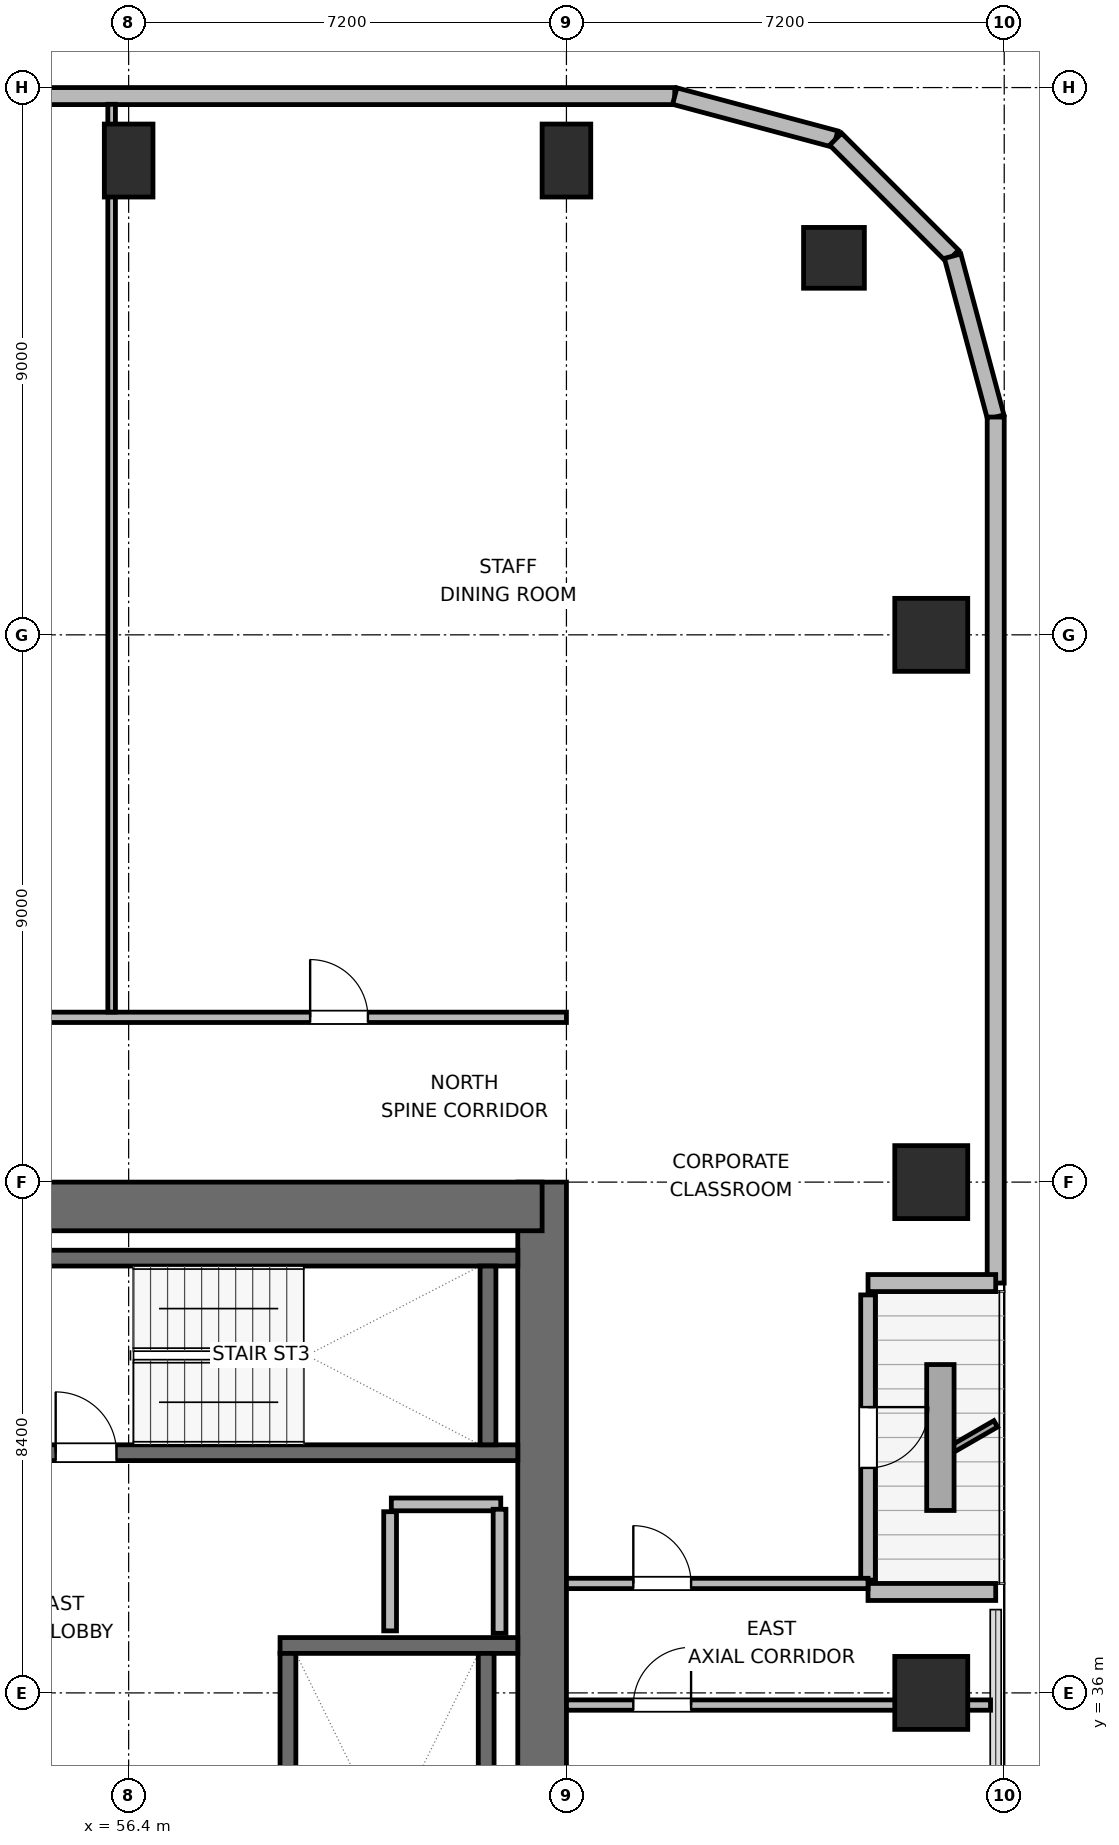
"""IFC4 building model, lengths in metres.
Left out: names, types, materials, properties, quantities, classifications, styles, units other than length and angle.
Written with IfcOpenShell. Run it as: python <this file> out.ifc"""

import sys

from ifc_helpers import new_model, si_unit, direction, frame, frame_2d, origin, origin_2d, place, context, subcontext, project, spatial, rectangle, circle, extrude, element, fill, save


model = new_model("IFC4")
c1 = context("Model", 3, precision=1e-05, world=origin(), true_north=direction((0.0, 1.0)))
c2 = subcontext(c1, "Body", "Model", "MODEL_VIEW")
j1 = project(units=[si_unit("LENGTHUNIT", "METRE"), si_unit("PLANEANGLEUNIT", "RADIAN")], contexts=[c1])
p1 = place(None, origin())
s1 = spatial("IfcSite", under=j1, at=p1, CompositionType="ELEMENT")
p2 = place(p1, origin())
s2 = spatial("IfcBuilding", under=s1, at=p2, CompositionType="ELEMENT")
p3 = place(p2, frame((0.0, 0.0, 162.3)))
s3 = spatial("IfcBuildingStorey", under=s2, at=p3, CompositionType="ELEMENT", Elevation=162.3)
p4 = place(p3, frame((63.2, 27.6, 0.0), z_axis=(0.0, 0.0, 1.0), x_axis=(0.0, 1.0, 0.0)))
e1 = element("IfcWall", 1, at=p4, inside=s3, PredefinedType="SHEAR", context=c2, shape_type="SweptSolid", body=[
    extrude(rectangle(XDim=16.8, YDim=0.8, at=frame_2d((8.4, 0.0))), origin(), (0.0, 0.0, 1.0), 3.9),
])
p5 = place(p3, frame((54.0, 44.0, 0.0), z_axis=(0.0, 0.0, 1.0), x_axis=(1.0, 0.0, 0.0)))
e2 = element("IfcWall", 2, at=p5, inside=s3, PredefinedType="SHEAR", context=c2, shape_type="SweptSolid", body=[
    extrude(rectangle(XDim=9.2, YDim=0.8, at=frame_2d((4.6, 0.0))), origin(), (0.0, 0.0, 1.0), 3.9),
])
p6 = place(p3, frame((58.89, 36.78, 0.0), z_axis=(0.0, 0.0, 1.0), x_axis=(1.0, 0.0, 0.0)))
e3 = element("IfcWall", 3, at=p6, inside=s3, PredefinedType="SHEAR", context=c2, shape_type="SweptSolid", body=[
    extrude(rectangle(XDim=3.91, YDim=0.26, at=frame_2d((1.955, 0.0))), origin(), (0.0, 0.0, 1.0), 3.9),
])
p7 = place(p3, frame((59.02, 29.05, 0.0), z_axis=(0.0, 0.0, 1.0), x_axis=(0.0, 1.0, 0.0)))
e4 = element("IfcWall", 4, at=p7, inside=s3, PredefinedType="SHEAR", context=c2, shape_type="SweptSolid", body=[
    extrude(rectangle(XDim=7.6, YDim=0.26, at=frame_2d((3.8, 0.0))), origin(), (0.0, 0.0, 1.0), 3.9),
])
p8 = place(p7, frame((0.3, 0.0, 0.0)))
e5 = element("IfcOpeningElement", 5, at=p8, cuts=e4, PredefinedType="OPENING", context=c2, shape_type="SweptSolid", body=[
    extrude(rectangle(XDim=1.0, YDim=2.04, at=frame_2d((0.5, 1.02))), frame((0.0, 0.14, 0.0), z_axis=(0.0, -1.0, 0.0), x_axis=(1.0, 0.0, 0.0)), (0.0, 0.0, 1.0), 0.28),
])
p9 = place(p3, frame((62.28, 29.05, 0.0), z_axis=(0.0, 0.0, 1.0), x_axis=(0.0, 1.0, 0.0)))
e6 = element("IfcWall", 6, at=p9, inside=s3, PredefinedType="SHEAR", context=c2, shape_type="SweptSolid", body=[
    extrude(rectangle(XDim=7.6, YDim=0.26, at=frame_2d((3.8, 0.0))), origin(), (0.0, 0.0, 1.0), 3.9),
])
p10 = place(p3, frame((54.4, 39.95, 0.0), z_axis=(0.0, 0.0, 1.0), x_axis=(1.0, 0.0, 0.0)))
e7 = element("IfcWall", 7, at=p10, inside=s3, PredefinedType="SHEAR", context=c2, shape_type="SweptSolid", body=[
    extrude(rectangle(XDim=8.4, YDim=0.26, at=frame_2d((4.2, 0.0))), origin(), (0.0, 0.0, 1.0), 3.9),
])
p11 = place(p10, frame((0.8, 0.0, 0.0)))
e8 = element("IfcOpeningElement", 8, at=p11, cuts=e7, PredefinedType="OPENING", context=c2, shape_type="SweptSolid", body=[
    extrude(rectangle(XDim=1.0, YDim=2.04, at=frame_2d((0.5, 1.02))), frame((0.0, 0.14, 0.0), z_axis=(0.0, -1.0, 0.0), x_axis=(1.0, 0.0, 0.0)), (0.0, 0.0, 1.0), 0.28),
])
p12 = place(p3, frame((54.4, 43.15, 0.0), z_axis=(0.0, 0.0, 1.0), x_axis=(1.0, 0.0, 0.0)))
e9 = element("IfcWall", 9, at=p12, inside=s3, PredefinedType="SHEAR", context=c2, shape_type="SweptSolid", body=[
    extrude(rectangle(XDim=8.4, YDim=0.26, at=frame_2d((4.2, 0.0))), origin(), (0.0, 0.0, 1.0), 3.9),
])
p13 = place(p3, frame((62.31, 40.08, 0.0), z_axis=(0.0, 0.0, 1.0), x_axis=(0.0, 1.0, 0.0)))
e10 = element("IfcWall", 10, at=p13, inside=s3, PredefinedType="SHEAR", context=c2, shape_type="SweptSolid", body=[
    extrude(rectangle(XDim=2.94, YDim=0.26, at=frame_2d((1.47, 0.0))), origin(), (0.0, 0.0, 1.0), 3.9),
])
p14 = place(p3, frame((68.0, 59.6, 0.0), z_axis=(0.0, 0.0, 1.0), x_axis=(1.0, 0.0, 0.0)))
e11 = element("IfcColumn", 11, at=p14, inside=s3, PredefinedType="COLUMN", context=c2, shape_type="SweptSolid", body=[
    extrude(circle(Radius=0.5, at=origin_2d()), origin(), (0.0, 0.0, 1.0), 3.9),
])
for number, where, z_axis, x_axis in (
    (12, (56.4, 61.2, 0.0), (0.0, 0.0, 1.0), (1.0, 0.0, 0.0)),
    (13, (63.6, 61.2, 0.0), (0.0, 0.0, 1.0), (1.0, 0.0, 0.0)),
):
    element("IfcColumn", number, at=place(p3, frame(where, z_axis=z_axis, x_axis=x_axis)), inside=s3, PredefinedType="COLUMN", context=c2, shape_type="SweptSolid", body=[
        extrude(rectangle(XDim=0.8, YDim=1.2, at=origin_2d()), origin(), (0.0, 0.0, 1.0), 3.9),
    ])
for number, where, z_axis, x_axis in (
    (14, (69.6, 36.0, 0.0), (0.0, 0.0, 1.0), (1.0, 0.0, 0.0)),
    (15, (69.6, 44.4, 0.0), (0.0, 0.0, 1.0), (1.0, 0.0, 0.0)),
    (16, (69.6, 53.4, 0.0), (0.0, 0.0, 1.0), (1.0, 0.0, 0.0)),
):
    element("IfcColumn", number, at=place(p3, frame(where, z_axis=z_axis, x_axis=x_axis)), inside=s3, PredefinedType="COLUMN", context=c2, shape_type="SweptSolid", body=[
        extrude(rectangle(XDim=1.2, YDim=1.2, at=origin_2d()), origin(), (0.0, 0.0, 1.0), 3.9),
    ])
p15 = place(p3, frame((54.64, 62.26, 0.0), z_axis=(0.0, 0.0, 1.0), x_axis=(1.0, 0.0, 0.0)))
e17 = element("IfcWall", 17, at=p15, inside=s3, PredefinedType="SOLIDWALL", context=c2, shape_type="SweptSolid", body=[
    extrude(rectangle(XDim=10.742, YDim=0.28, at=frame_2d((5.371, 0.0))), origin(), (0.0, 0.0, 1.0), 3.68),
])
p16 = place(p3, frame((65.382, 62.26, 0.0), z_axis=(0.0, 0.0, 1.0), x_axis=(0.965971118627, -0.258649952598, 0.0)))
e18 = element("IfcWall", 18, at=p16, inside=s3, PredefinedType="SOLIDWALL", context=c2, shape_type="SweptSolid", body=[
    extrude(rectangle(XDim=2.739, YDim=0.28, at=frame_2d((1.37, 0.0))), origin(), (0.0, 0.0, 1.0), 3.68),
])
p17 = place(p3, frame((68.028, 61.552, 0.0), z_axis=(0.0, 0.0, 1.0), x_axis=(0.707061915429, -0.707151644098, 0.0)))
e19 = element("IfcWall", 19, at=p17, inside=s3, PredefinedType="SOLIDWALL", context=c2, shape_type="SweptSolid", body=[
    extrude(rectangle(XDim=2.721, YDim=0.28, at=frame_2d((1.36, 0.0))), origin(), (0.0, 0.0, 1.0), 3.68),
])
p18 = place(p3, frame((69.951, 59.627, 0.0), z_axis=(0.0, 0.0, 1.0), x_axis=(0.258672222976, -0.9659651552, 0.0)))
e20 = element("IfcWall", 20, at=p18, inside=s3, PredefinedType="SOLIDWALL", context=c2, shape_type="SweptSolid", body=[
    extrude(rectangle(XDim=2.739, YDim=0.28, at=frame_2d((1.37, 0.0))), origin(), (0.0, 0.0, 1.0), 3.68),
])
p19 = place(p3, frame((70.66, 56.982, 0.0), z_axis=(0.0, 0.0, 1.0), x_axis=(0.0, -1.0, 0.0)))
e21 = element("IfcWall", 21, at=p19, inside=s3, PredefinedType="SOLIDWALL", context=c2, shape_type="SweptSolid", body=[
    extrude(rectangle(XDim=14.242, YDim=0.28, at=frame_2d((7.121, 0.0))), origin(), (0.0, 0.0, 1.0), 3.68),
])
p20 = place(p3, frame((70.66, 42.74, 0.0), z_axis=(0.0, 0.0, 1.0), x_axis=(-1.0, 0.0, 0.0)))
e22 = element("IfcWall", 22, at=p20, inside=s3, PredefinedType="SOLIDWALL", context=c2, shape_type="SweptSolid", body=[
    extrude(rectangle(XDim=2.1, YDim=0.28, at=frame_2d((1.05, 0.0))), origin(), (0.0, 0.0, 1.0), 3.116),
])
p21 = place(p3, frame((68.56, 42.545, 0.0), z_axis=(0.0, 0.0, 1.0), x_axis=(0.0, -1.0, 0.0)))
e23 = element("IfcWall", 23, at=p21, inside=s3, PredefinedType="SOLIDWALL", context=c2, shape_type="SweptSolid", body=[
    extrude(rectangle(XDim=4.69, YDim=0.24, at=frame_2d((2.345, 0.0))), origin(), (0.0, 0.0, 1.0), 3.248),
])
p22 = place(p21, frame((1.845, 0.0, 0.0)))
e24 = element("IfcOpeningElement", 24, at=p22, cuts=e23, PredefinedType="OPENING", context=c2, shape_type="SweptSolid", body=[
    extrude(rectangle(XDim=1.0, YDim=2.02, at=frame_2d((0.5, 1.01))), frame((0.0, 0.13, 0.0), z_axis=(0.0, -1.0, 0.0), x_axis=(1.0, 0.0, 0.0)), (0.0, 0.0, 1.0), 0.26),
])
p23 = place(p3, frame((68.56, 37.66, 0.0), z_axis=(0.0, 0.0, 1.0), x_axis=(1.0, 0.0, 0.0)))
e25 = element("IfcWall", 25, at=p23, inside=s3, PredefinedType="SOLIDWALL", context=c2, shape_type="SweptSolid", body=[
    extrude(rectangle(XDim=2.1, YDim=0.28, at=frame_2d((1.05, 0.0))), origin(), (0.0, 0.0, 1.0), 3.116),
])
p24 = place(p3, frame((60.72, 39.1, 0.0), z_axis=(0.0, 0.0, 1.0), x_axis=(1.0, 0.0, 0.0)))
e26 = element("IfcWall", 26, at=p24, inside=s3, PredefinedType="PARTITIONING", context=c2, shape_type="SweptSolid", body=[
    extrude(rectangle(XDim=1.8, YDim=0.21, at=frame_2d((0.9, 0.0))), origin(), (0.0, 0.0, 1.0), 3.68),
])
p25 = place(p3, frame((60.7, 37.02, 0.0), z_axis=(0.0, 0.0, 1.0), x_axis=(0.0, 1.0, 0.0)))
e27 = element("IfcWall", 27, at=p25, inside=s3, PredefinedType="PARTITIONING", context=c2, shape_type="SweptSolid", body=[
    extrude(rectangle(XDim=1.96, YDim=0.21, at=frame_2d((0.98, 0.0))), origin(), (0.0, 0.0, 1.0), 3.68),
])
p26 = place(p3, frame((62.5, 36.98, 0.0), z_axis=(0.0, 0.0, 1.0), x_axis=(0.0, 1.0, 0.0)))
e28 = element("IfcWall", 28, at=p26, inside=s3, PredefinedType="PARTITIONING", context=c2, shape_type="SweptSolid", body=[
    extrude(rectangle(XDim=2.04, YDim=0.21, at=frame_2d((1.02, 0.0))), origin(), (0.0, 0.0, 1.0), 3.68),
])
p27 = place(p3, frame((29.8, 47.11, 0.0), z_axis=(0.0, 0.0, 1.0), x_axis=(1.0, 0.0, 0.0)))
e29 = element("IfcWall", 29, at=p27, inside=s3, PredefinedType="PARTITIONING", context=c2, shape_type="SweptSolid", body=[
    extrude(rectangle(XDim=33.8, YDim=0.17, at=frame_2d((16.9, 0.0))), origin(), (0.0, 0.0, 1.0), 3.68),
])
p28 = place(p27, frame((0.625, 0.0, 0.0)))
e30 = element("IfcOpeningElement", 30, at=p28, cuts=e29, PredefinedType="OPENING", context=c2, shape_type="SweptSolid", body=[
    extrude(rectangle(XDim=0.95, YDim=2.04, at=frame_2d((0.475, 1.02))), frame((0.0, 0.095, 0.0), z_axis=(0.0, -1.0, 0.0), x_axis=(1.0, 0.0, 0.0)), (0.0, 0.0, 1.0), 0.19),
])
p29 = place(p27, frame((6.185, 0.0, 0.0)))
e31 = element("IfcOpeningElement", 31, at=p29, cuts=e29, PredefinedType="OPENING", context=c2, shape_type="SweptSolid", body=[
    extrude(rectangle(XDim=0.95, YDim=2.04, at=frame_2d((0.475, 1.02))), frame((0.0, 0.095, 0.0), z_axis=(0.0, -1.0, 0.0), x_axis=(1.0, 0.0, 0.0)), (0.0, 0.0, 1.0), 0.19),
])
p30 = place(p27, frame((12.465, 0.0, 0.0)))
e32 = element("IfcOpeningElement", 32, at=p30, cuts=e29, PredefinedType="OPENING", context=c2, shape_type="SweptSolid", body=[
    extrude(rectangle(XDim=0.95, YDim=2.04, at=frame_2d((0.475, 1.02))), frame((0.0, 0.095, 0.0), z_axis=(0.0, -1.0, 0.0), x_axis=(1.0, 0.0, 0.0)), (0.0, 0.0, 1.0), 0.19),
])
p31 = place(p27, frame((20.065, 0.0, 0.0)))
e33 = element("IfcOpeningElement", 33, at=p31, cuts=e29, PredefinedType="OPENING", context=c2, shape_type="SweptSolid", body=[
    extrude(rectangle(XDim=0.95, YDim=2.04, at=frame_2d((0.475, 1.02))), frame((0.0, 0.095, 0.0), z_axis=(0.0, -1.0, 0.0), x_axis=(1.0, 0.0, 0.0)), (0.0, 0.0, 1.0), 0.19),
])
p32 = place(p27, frame((29.585, 0.0, 0.0)))
e34 = element("IfcOpeningElement", 34, at=p32, cuts=e29, PredefinedType="OPENING", context=c2, shape_type="SweptSolid", body=[
    extrude(rectangle(XDim=0.95, YDim=2.04, at=frame_2d((0.475, 1.02))), frame((0.0, 0.095, 0.0), z_axis=(0.0, -1.0, 0.0), x_axis=(1.0, 0.0, 0.0)), (0.0, 0.0, 1.0), 0.19),
])
p33 = place(p3, frame((56.12, 47.197, 0.0), z_axis=(0.0, 0.0, 1.0), x_axis=(0.0, 1.0, 0.0)))
e35 = element("IfcWall", 35, at=p33, inside=s3, PredefinedType="PARTITIONING", context=c2, shape_type="SweptSolid", body=[
    extrude(rectangle(XDim=14.928, YDim=0.125, at=frame_2d((7.464, 0.0))), origin(), (0.0, 0.0, 1.0), 3.043),
])
p34 = place(p3, frame((63.6, 35.8, 0.0), z_axis=(0.0, 0.0, 1.0), x_axis=(1.0, 0.0, 0.0)))
e36 = element("IfcWall", 36, at=p34, inside=s3, PredefinedType="PARTITIONING", context=c2, shape_type="SweptSolid", body=[
    extrude(rectangle(XDim=6.975, YDim=0.17, at=frame_2d((3.487, 0.0))), origin(), (0.0, 0.0, 1.0), 3.043),
])
p35 = place(p34, frame((1.1, 0.0, 0.0)))
e37 = element("IfcOpeningElement", 37, at=p35, cuts=e36, PredefinedType="OPENING", context=c2, shape_type="SweptSolid", body=[
    extrude(rectangle(XDim=0.95, YDim=2.04, at=frame_2d((0.475, 1.02))), frame((0.0, 0.095, 0.0), z_axis=(0.0, -1.0, 0.0), x_axis=(1.0, 0.0, 0.0)), (0.0, 0.0, 1.0), 0.19),
])
p36 = place(p3, frame((63.6, 37.8, 0.0), z_axis=(0.0, 0.0, 1.0), x_axis=(1.0, 0.0, 0.0)))
e38 = element("IfcWall", 38, at=p36, inside=s3, PredefinedType="PARTITIONING", context=c2, shape_type="SweptSolid", body=[
    extrude(rectangle(XDim=4.96, YDim=0.17, at=frame_2d((2.48, 0.0))), origin(), (0.0, 0.0, 1.0), 3.68),
])
p37 = place(p36, frame((1.1, 0.0, 0.0)))
e39 = element("IfcOpeningElement", 39, at=p37, cuts=e38, PredefinedType="OPENING", context=c2, shape_type="SweptSolid", body=[
    extrude(rectangle(XDim=0.95, YDim=2.04, at=frame_2d((0.475, 1.02))), frame((0.0, 0.095, 0.0), z_axis=(0.0, -1.0, 0.0), x_axis=(1.0, 0.0, 0.0)), (0.0, 0.0, 1.0), 0.19),
])
p38 = place(p22, origin())
e40 = element("IfcDoor", 40, at=p38, inside=s3, OperationType="SINGLE_SWING_LEFT", PredefinedType="DOOR", context=c2, shape_type="SweptSolid", body=[
    extrude(rectangle(XDim=1.0, YDim=2.02, at=frame_2d((0.5, 1.01))), frame((0.0, 0.025, 0.0), z_axis=(0.0, -1.0, 0.0), x_axis=(1.0, 0.0, 0.0)), (0.0, 0.0, 1.0), 0.05),
])
fill(e24, e40)
p39 = place(p11, origin())
e41 = element("IfcDoor", 41, at=p39, inside=s3, OperationType="SINGLE_SWING_LEFT", PredefinedType="DOOR", context=c2, shape_type="SweptSolid", body=[
    extrude(rectangle(XDim=1.0, YDim=2.04, at=frame_2d((0.5, 1.02))), frame((0.0, 0.025, 0.0), z_axis=(0.0, -1.0, 0.0), x_axis=(1.0, 0.0, 0.0)), (0.0, 0.0, 1.0), 0.05),
])
fill(e8, e41)
p40 = place(p32, origin())
e42 = element("IfcDoor", 42, at=p40, inside=s3, OperationType="SINGLE_SWING_LEFT", PredefinedType="DOOR", context=c2, shape_type="SweptSolid", body=[
    extrude(rectangle(XDim=0.95, YDim=2.04, at=frame_2d((0.475, 1.02))), frame((0.0, 0.025, 0.0), z_axis=(0.0, -1.0, 0.0), x_axis=(1.0, 0.0, 0.0)), (0.0, 0.0, 1.0), 0.05),
])
fill(e34, e42)
p41 = place(p35, origin())
e43 = element("IfcDoor", 43, at=p41, inside=s3, OperationType="SINGLE_SWING_RIGHT", PredefinedType="DOOR", context=c2, shape_type="SweptSolid", body=[
    extrude(rectangle(XDim=0.95, YDim=2.04, at=frame_2d((0.475, 1.02))), frame((0.0, 0.025, 0.0), z_axis=(0.0, -1.0, 0.0), x_axis=(1.0, 0.0, 0.0)), (0.0, 0.0, 1.0), 0.05),
])
fill(e37, e43)
p42 = place(p37, origin())
e44 = element("IfcDoor", 44, at=p42, inside=s3, OperationType="SINGLE_SWING_LEFT", PredefinedType="DOOR", context=c2, shape_type="SweptSolid", body=[
    extrude(rectangle(XDim=0.95, YDim=2.04, at=frame_2d((0.475, 1.02))), frame((0.0, 0.025, 0.0), z_axis=(0.0, -1.0, 0.0), x_axis=(1.0, 0.0, 0.0)), (0.0, 0.0, 1.0), 0.05),
])
fill(e39, e44)
save(model, sys.argv[1])
